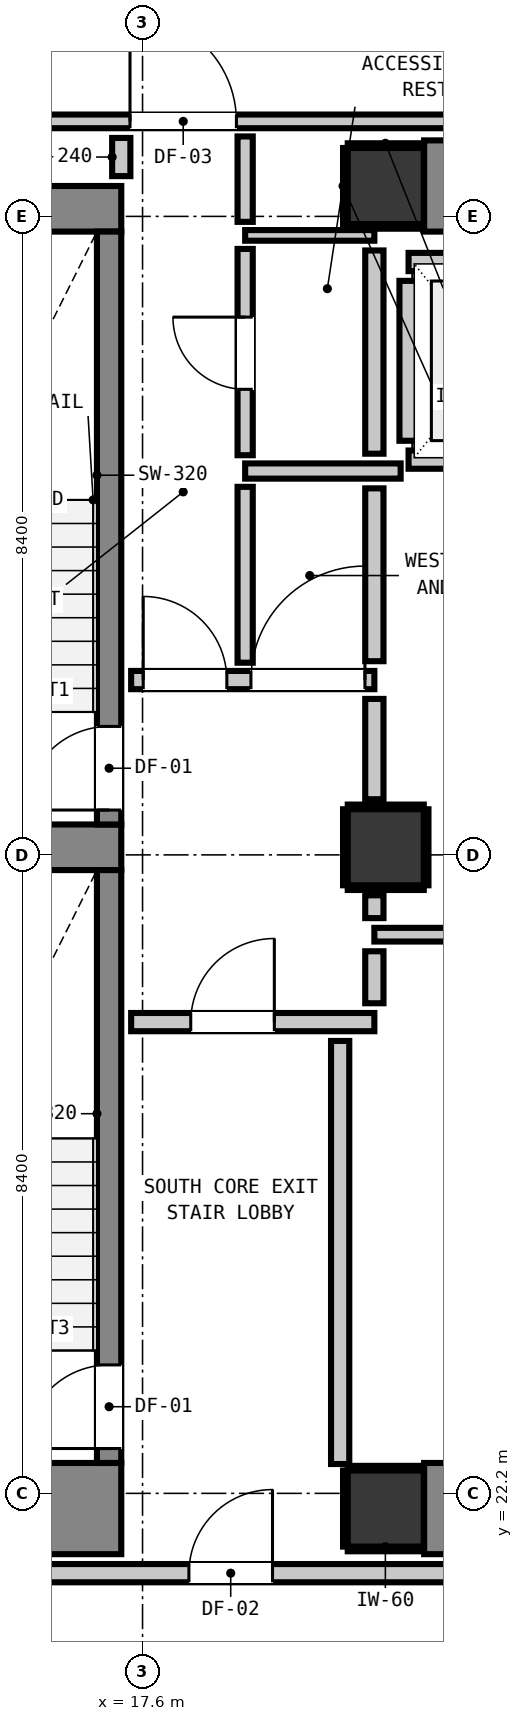
"""IFC4 building model, lengths in metres.
Left out: names, types, materials, properties, quantities, classifications, styles, units other than length and angle.
Written with IfcOpenShell. Run it as: python <this file> out.ifc"""

import sys

from ifc_helpers import new_model, si_unit, direction, frame, frame_2d, origin, origin_2d, place, context, subcontext, project, spatial, rectangle, extrude, element, fill, save


model = new_model("IFC4")
c1 = context("Model", 3, precision=1e-05, world=origin(), true_north=direction((0.0, 1.0)))
c2 = subcontext(c1, "Body", "Model", "MODEL_VIEW")
j1 = project(units=[si_unit("LENGTHUNIT", "METRE"), si_unit("PLANEANGLEUNIT", "RADIAN")], contexts=[c1])
p1 = place(None, origin())
s1 = spatial("IfcSite", under=j1, at=p1, CompositionType="ELEMENT")
p2 = place(p1, origin())
s2 = spatial("IfcBuilding", under=s1, at=p2, CompositionType="ELEMENT")
p3 = place(p2, frame((0.0, 0.0, 61.84)))
s3 = spatial("IfcBuildingStorey", under=s2, at=p3, CompositionType="ELEMENT", Elevation=61.84)
for number, where, z_axis, x_axis in (
    (1, (20.8, 22.0, 0.0), (0.0, 0.0, 1.0), (1.0, 0.0, 0.0)),
    (2, (20.8, 39.4, 0.0), (0.0, 0.0, 1.0), (1.0, 0.0, 0.0)),
):
    element("IfcColumn", number, at=place(p3, frame(where, z_axis=z_axis, x_axis=x_axis)), inside=s3, PredefinedType="COLUMN", context=c2, shape_type="SweptSolid", body=[
        extrude(rectangle(XDim=1.0, YDim=1.0, at=origin_2d()), origin(), (0.0, 0.0, 1.0), 3.32),
    ])
p4 = place(p3, frame((13.24, 22.0, 0.0), z_axis=(0.0, 0.0, 1.0), x_axis=(1.0, 0.0, 0.0)))
e3 = element("IfcWall", 3, at=p4, inside=s3, PredefinedType="SHEAR", context=c2, shape_type="SweptSolid", body=[
    extrude(rectangle(XDim=4.08, YDim=1.2, at=frame_2d((2.04, 0.0))), origin(), (0.0, 0.0, 1.0), 3.32),
])
p5 = place(p3, frame((13.24, 39.1, 0.0), z_axis=(0.0, 0.0, 1.0), x_axis=(1.0, 0.0, 0.0)))
e4 = element("IfcWall", 4, at=p5, inside=s3, PredefinedType="SHEAR", context=c2, shape_type="SweptSolid", body=[
    extrude(rectangle(XDim=4.08, YDim=0.6, at=frame_2d((2.04, 0.0))), origin(), (0.0, 0.0, 1.0), 3.32),
])
p6 = place(p3, frame((13.905, 30.7, 0.0), z_axis=(0.0, 0.0, 1.0), x_axis=(1.0, 0.0, 0.0)))
e5 = element("IfcWall", 5, at=p6, inside=s3, PredefinedType="SHEAR", context=c2, shape_type="SweptSolid", body=[
    extrude(rectangle(XDim=3.415, YDim=0.6, at=frame_2d((1.708, 0.0))), origin(), (0.0, 0.0, 1.0), 3.32),
])
for number, where, z_axis, x_axis in (
    (6, (21.305, 22.0, 0.0), (0.0, 0.0, 1.0), (1.0, 0.0, 0.0)),
    (7, (21.305, 39.4, 0.0), (0.0, 0.0, 1.0), (1.0, 0.0, 0.0)),
):
    element("IfcWall", number, at=place(p3, frame(where, z_axis=z_axis, x_axis=x_axis)), inside=s3, PredefinedType="SHEAR", context=c2, shape_type="SweptSolid", body=[
        extrude(rectangle(XDim=7.39, YDim=1.2, at=frame_2d((3.695, 0.0))), origin(), (0.0, 0.0, 1.0), 3.32),
    ])
p7 = place(p3, frame((17.16, 31.0, 0.0), z_axis=(0.0, 0.0, 1.0), x_axis=(0.0, 1.0, 0.0)))
e8 = element("IfcWall", 8, at=p7, inside=s3, PredefinedType="SHEAR", context=c2, shape_type="SweptSolid", body=[
    extrude(rectangle(XDim=7.8, YDim=0.32, at=frame_2d((3.9, 0.0))), origin(), (0.0, 0.0, 1.0), 3.32),
])
p8 = place(p7, frame((0.19, 0.0, 0.0)))
e9 = element("IfcOpeningElement", 9, at=p8, cuts=e8, PredefinedType="OPENING", context=c2, shape_type="SweptSolid", body=[
    extrude(rectangle(XDim=1.1, YDim=2.15, at=frame_2d((0.55, 1.075))), frame((0.0, 0.17, 0.0), z_axis=(0.0, -1.0, 0.0), x_axis=(1.0, 0.0, 0.0)), (0.0, 0.0, 1.0), 0.34),
])
p9 = place(p3, frame((17.16, 22.6, 0.0), z_axis=(0.0, 0.0, 1.0), x_axis=(0.0, 1.0, 0.0)))
e10 = element("IfcWall", 10, at=p9, inside=s3, PredefinedType="SHEAR", context=c2, shape_type="SweptSolid", body=[
    extrude(rectangle(XDim=7.8, YDim=0.32, at=frame_2d((3.9, 0.0))), origin(), (0.0, 0.0, 1.0), 3.32),
])
p10 = place(p9, frame((0.19, 0.0, 0.0)))
e11 = element("IfcOpeningElement", 11, at=p10, cuts=e10, PredefinedType="OPENING", context=c2, shape_type="SweptSolid", body=[
    extrude(rectangle(XDim=1.1, YDim=2.15, at=frame_2d((0.55, 1.075))), frame((0.0, 0.17, 0.0), z_axis=(0.0, -1.0, 0.0), x_axis=(1.0, 0.0, 0.0)), (0.0, 0.0, 1.0), 0.34),
])
p11 = place(p3, frame((20.8, 30.7, 0.0), z_axis=(0.0, 0.0, 1.0), x_axis=(1.0, 0.0, 0.0)))
e12 = element("IfcColumn", 12, at=p11, inside=s3, PredefinedType="COLUMN", context=c2, shape_type="SweptSolid", body=[
    extrude(rectangle(XDim=1.0, YDim=1.0, at=origin_2d()), origin(), (0.0, 0.0, 1.0), 3.32),
])
for number, where, z_axis, x_axis in (
    (13, (21.1, 35.8, 0.0), (0.0, 0.0, 1.0), (1.0, 0.0, 0.0)),
    (14, (21.1, 38.4, 0.0), (0.0, 0.0, 1.0), (1.0, 0.0, 0.0)),
):
    element("IfcWall", number, at=place(p3, frame(where, z_axis=z_axis, x_axis=x_axis)), inside=s3, PredefinedType="PARTITIONING", context=c2, shape_type="SweptSolid", body=[
        extrude(rectangle(XDim=2.2, YDim=0.24, at=frame_2d((1.1, 0.0))), origin(), (0.0, 0.0, 1.0), 3.06),
    ])
p12 = place(p3, frame((21.1, 36.048, 0.0), z_axis=(0.0, 0.0, 1.0), x_axis=(0.0, 1.0, 0.0)))
e15 = element("IfcWall", 15, at=p12, inside=s3, PredefinedType="PARTITIONING", context=c2, shape_type="SweptSolid", body=[
    extrude(rectangle(XDim=2.104, YDim=0.24, at=frame_2d((1.052, 0.0))), origin(), (0.0, 0.0, 1.0), 2.295),
])
p13 = place(p3, frame((10.15, 21.15, 0.0), z_axis=(0.0, 0.0, 1.0), x_axis=(1.0, 0.0, 0.0)))
e16 = element("IfcWall", 16, at=p13, inside=s3, PredefinedType="PARTITIONING", context=c2, shape_type="SweptSolid", body=[
    extrude(rectangle(XDim=26.779, YDim=0.24, at=frame_2d((13.39, 0.0))), origin(), (0.0, 0.0, 1.0), 3.06),
])
p14 = place(p13, frame((8.06, 0.0, 0.0)))
e17 = element("IfcOpeningElement", 17, at=p14, cuts=e16, PredefinedType="OPENING", context=c2, shape_type="SweptSolid", body=[
    extrude(rectangle(XDim=1.1, YDim=2.15, at=frame_2d((0.55, 1.075))), frame((0.0, 0.13, 0.0), z_axis=(0.0, -1.0, 0.0), x_axis=(1.0, 0.0, 0.0)), (0.0, 0.0, 1.0), 0.26),
])
p15 = place(p13, frame((0.324, 0.0, 0.0)))
e18 = element("IfcOpeningElement", 18, at=p15, cuts=e16, PredefinedType="OPENING", context=c2, shape_type="SweptSolid", body=[
    extrude(rectangle(XDim=1.4, YDim=2.15, at=frame_2d((0.7, 1.075))), frame((0.0, 0.13, 0.0), z_axis=(0.0, -1.0, 0.0), x_axis=(1.0, 0.0, 0.0)), (0.0, 0.0, 1.0), 0.26),
])
p16 = place(p3, frame((17.45, 28.4, 0.0), z_axis=(0.0, 0.0, 1.0), x_axis=(1.0, 0.0, 0.0)))
e19 = element("IfcWall", 19, at=p16, inside=s3, PredefinedType="PARTITIONING", context=c2, shape_type="SweptSolid", body=[
    extrude(rectangle(XDim=3.2, YDim=0.24, at=frame_2d((1.6, 0.0))), origin(), (0.0, 0.0, 1.0), 3.06),
])
p17 = place(p16, frame((0.784, 0.0, 0.0)))
e20 = element("IfcOpeningElement", 20, at=p17, cuts=e19, PredefinedType="OPENING", context=c2, shape_type="SweptSolid", body=[
    extrude(rectangle(XDim=1.1, YDim=2.15, at=frame_2d((0.55, 1.075))), frame((0.0, 0.13, 0.0), z_axis=(0.0, -1.0, 0.0), x_axis=(1.0, 0.0, 0.0)), (0.0, 0.0, 1.0), 0.26),
])
p18 = place(p3, frame((17.45, 32.9, 0.0), z_axis=(0.0, 0.0, 1.0), x_axis=(1.0, 0.0, 0.0)))
e21 = element("IfcWall", 21, at=p18, inside=s3, PredefinedType="PARTITIONING", context=c2, shape_type="SweptSolid", body=[
    extrude(rectangle(XDim=3.2, YDim=0.24, at=frame_2d((1.6, 0.0))), origin(), (0.0, 0.0, 1.0), 3.06),
])
p19 = place(p18, frame((0.159, 0.0, 0.0)))
e22 = element("IfcOpeningElement", 22, at=p19, cuts=e21, PredefinedType="OPENING", context=c2, shape_type="SweptSolid", body=[
    extrude(rectangle(XDim=1.1, YDim=2.15, at=frame_2d((0.55, 1.075))), frame((0.0, 0.13, 0.0), z_axis=(0.0, -1.0, 0.0), x_axis=(1.0, 0.0, 0.0)), (0.0, 0.0, 1.0), 0.26),
])
p20 = place(p18, frame((1.576, 0.0, 0.0)))
e23 = element("IfcOpeningElement", 23, at=p20, cuts=e21, PredefinedType="OPENING", context=c2, shape_type="SweptSolid", body=[
    extrude(rectangle(XDim=1.5, YDim=2.15, at=frame_2d((0.75, 1.075))), frame((0.0, 0.13, 0.0), z_axis=(0.0, -1.0, 0.0), x_axis=(1.0, 0.0, 0.0)), (0.0, 0.0, 1.0), 0.26),
])
p21 = place(p3, frame((18.95, 35.65, 0.0), z_axis=(0.0, 0.0, 1.0), x_axis=(1.0, 0.0, 0.0)))
e24 = element("IfcWall", 24, at=p21, inside=s3, PredefinedType="PARTITIONING", context=c2, shape_type="SweptSolid", body=[
    extrude(rectangle(XDim=2.046, YDim=0.2, at=frame_2d((1.023, 0.0))), origin(), (0.0, 0.0, 1.0), 3.06),
])
p22 = place(p3, frame((20.65, 29.55, 0.0), z_axis=(0.0, 0.0, 1.0), x_axis=(1.0, 0.0, 0.0)))
e25 = element("IfcWall", 25, at=p22, inside=s3, PredefinedType="PARTITIONING", context=c2, shape_type="SweptSolid", body=[
    extrude(rectangle(XDim=9.325, YDim=0.18, at=frame_2d((4.663, 0.0))), origin(), (0.0, 0.0, 1.0), 3.06),
])
p23 = place(p3, frame((10.15, 40.25, 0.0), z_axis=(0.0, 0.0, 1.0), x_axis=(1.0, 0.0, 0.0)))
e26 = element("IfcWall", 26, at=p23, inside=s3, PredefinedType="PARTITIONING", context=c2, shape_type="SweptSolid", body=[
    extrude(rectangle(XDim=40.023, YDim=0.18, at=frame_2d((20.012, 0.0))), origin(), (0.0, 0.0, 1.0), 3.06),
])
p24 = place(p23, frame((7.285, 0.0, 0.0)))
e27 = element("IfcOpeningElement", 27, at=p24, cuts=e26, PredefinedType="OPENING", context=c2, shape_type="SweptSolid", body=[
    extrude(rectangle(XDim=1.4, YDim=2.15, at=frame_2d((0.7, 1.075))), frame((0.0, 0.1, 0.0), z_axis=(0.0, -1.0, 0.0), x_axis=(1.0, 0.0, 0.0)), (0.0, 0.0, 1.0), 0.2),
])
p25 = place(p23, frame((0.324, 0.0, 0.0)))
e28 = element("IfcOpeningElement", 28, at=p25, cuts=e26, PredefinedType="OPENING", context=c2, shape_type="SweptSolid", body=[
    extrude(rectangle(XDim=1.4, YDim=2.15, at=frame_2d((0.7, 1.075))), frame((0.0, 0.1, 0.0), z_axis=(0.0, -1.0, 0.0), x_axis=(1.0, 0.0, 0.0)), (0.0, 0.0, 1.0), 0.2),
])
p26 = place(p23, frame((31.825, 0.0, 0.0)))
e29 = element("IfcOpeningElement", 29, at=p26, cuts=e26, PredefinedType="OPENING", context=c2, shape_type="SweptSolid", body=[
    extrude(rectangle(XDim=1.0, YDim=2.15, at=frame_2d((0.5, 1.075))), frame((0.0, 0.1, 0.0), z_axis=(0.0, -1.0, 0.0), x_axis=(1.0, 0.0, 0.0)), (0.0, 0.0, 1.0), 0.2),
])
p27 = place(p3, frame((18.95, 38.75, 0.0), z_axis=(0.0, 0.0, 1.0), x_axis=(1.0, 0.0, 0.0)))
e30 = element("IfcWall", 30, at=p27, inside=s3, PredefinedType="PARTITIONING", context=c2, shape_type="SweptSolid", body=[
    extrude(rectangle(XDim=1.7, YDim=0.14, at=frame_2d((0.85, 0.0))), origin(), (0.0, 0.0, 1.0), 3.06),
])
p28 = place(p3, frame((17.32, 39.53, 0.0), z_axis=(0.0, 0.0, 1.0), x_axis=(0.0, 1.0, 0.0)))
e31 = element("IfcWall", 31, at=p28, inside=s3, PredefinedType="PARTITIONING", context=c2, shape_type="SweptSolid", body=[
    extrude(rectangle(XDim=0.502, YDim=0.24, at=frame_2d((0.251, 0.0))), origin(), (0.0, 0.0, 1.0), 3.06),
])
p29 = place(p3, frame((20.2, 22.586, 0.0), z_axis=(0.0, 0.0, 1.0), x_axis=(0.0, 1.0, 0.0)))
e32 = element("IfcWall", 32, at=p29, inside=s3, PredefinedType="PARTITIONING", context=c2, shape_type="SweptSolid", body=[
    extrude(rectangle(XDim=5.566, YDim=0.24, at=frame_2d((2.783, 0.0))), origin(), (0.0, 0.0, 1.0), 3.06),
])
p30 = place(p3, frame((20.65, 28.648, 0.0), z_axis=(0.0, 0.0, 1.0), x_axis=(0.0, 1.0, 0.0)))
e33 = element("IfcWall", 33, at=p30, inside=s3, PredefinedType="PARTITIONING", context=c2, shape_type="SweptSolid", body=[
    extrude(rectangle(XDim=0.684, YDim=0.24, at=frame_2d((0.342, 0.0))), origin(), (0.0, 0.0, 1.0), 2.295),
])
p31 = place(p3, frame((20.65, 29.768, 0.0), z_axis=(0.0, 0.0, 1.0), x_axis=(0.0, 1.0, 0.0)))
e34 = element("IfcWall", 34, at=p31, inside=s3, PredefinedType="PARTITIONING", context=c2, shape_type="SweptSolid", body=[
    extrude(rectangle(XDim=0.3, YDim=0.24, at=frame_2d((0.15, 0.0))), origin(), (0.0, 0.0, 1.0), 2.295),
])
p32 = place(p3, frame((20.65, 31.332, 0.0), z_axis=(0.0, 0.0, 1.0), x_axis=(0.0, 1.0, 0.0)))
e35 = element("IfcWall", 35, at=p32, inside=s3, PredefinedType="PARTITIONING", context=c2, shape_type="SweptSolid", body=[
    extrude(rectangle(XDim=1.32, YDim=0.24, at=frame_2d((0.66, 0.0))), origin(), (0.0, 0.0, 1.0), 2.295),
])
p33 = place(p3, frame((20.65, 33.148, 0.0), z_axis=(0.0, 0.0, 1.0), x_axis=(0.0, 1.0, 0.0)))
e36 = element("IfcWall", 36, at=p33, inside=s3, PredefinedType="PARTITIONING", context=c2, shape_type="SweptSolid", body=[
    extrude(rectangle(XDim=2.274, YDim=0.24, at=frame_2d((1.137, 0.0))), origin(), (0.0, 0.0, 1.0), 2.295),
])
p34 = place(p3, frame((20.65, 35.878, 0.0), z_axis=(0.0, 0.0, 1.0), x_axis=(0.0, 1.0, 0.0)))
e37 = element("IfcWall", 37, at=p34, inside=s3, PredefinedType="PARTITIONING", context=c2, shape_type="SweptSolid", body=[
    extrude(rectangle(XDim=2.674, YDim=0.24, at=frame_2d((1.337, 0.0))), origin(), (0.0, 0.0, 1.0), 2.295),
])
p35 = place(p3, frame((18.95, 33.128, 0.0), z_axis=(0.0, 0.0, 1.0), x_axis=(0.0, 1.0, 0.0)))
e38 = element("IfcWall", 38, at=p35, inside=s3, PredefinedType="PARTITIONING", context=c2, shape_type="SweptSolid", body=[
    extrude(rectangle(XDim=2.314, YDim=0.2, at=frame_2d((1.157, 0.0))), origin(), (0.0, 0.0, 1.0), 3.06),
])
p36 = place(p3, frame((18.95, 35.858, 0.0), z_axis=(0.0, 0.0, 1.0), x_axis=(0.0, 1.0, 0.0)))
e39 = element("IfcWall", 39, at=p36, inside=s3, PredefinedType="PARTITIONING", context=c2, shape_type="SweptSolid", body=[
    extrude(rectangle(XDim=2.714, YDim=0.2, at=frame_2d((1.357, 0.0))), origin(), (0.0, 0.0, 1.0), 3.06),
])
p37 = place(p36, frame((0.867, 0.0, 0.0)))
e40 = element("IfcOpeningElement", 40, at=p37, cuts=e39, PredefinedType="OPENING", context=c2, shape_type="SweptSolid", body=[
    extrude(rectangle(XDim=0.95, YDim=2.1, at=frame_2d((0.475, 1.05))), frame((0.0, 0.11, 0.0), z_axis=(0.0, -1.0, 0.0), x_axis=(1.0, 0.0, 0.0)), (0.0, 0.0, 1.0), 0.22),
])
p38 = place(p3, frame((18.95, 38.928, 0.0), z_axis=(0.0, 0.0, 1.0), x_axis=(0.0, 1.0, 0.0)))
e41 = element("IfcWall", 41, at=p38, inside=s3, PredefinedType="PARTITIONING", context=c2, shape_type="SweptSolid", body=[
    extrude(rectangle(XDim=1.124, YDim=0.2, at=frame_2d((0.562, 0.0))), origin(), (0.0, 0.0, 1.0), 3.06),
])
for number, where, z_axis, x_axis in (
    (42, (20.3, 21.468, 0.0), (0.0, 0.0, 1.0), (1.0, 0.0, 0.0)),
    (43, (20.3, 22.532, 0.0), (0.0, 0.0, 1.0), (1.0, 0.0, 0.0)),
):
    element("IfcWall", number, at=place(p3, frame(where, z_axis=z_axis, x_axis=x_axis)), inside=s3, PredefinedType="PARTITIONING", context=c2, shape_type="SweptSolid", body=[
        extrude(rectangle(XDim=0.99, YDim=0.06, at=frame_2d((0.495, 0.0))), origin(), (0.0, 0.0, 1.0), 1.45),
    ])
p39 = place(p3, frame((20.268, 21.5, 0.0), z_axis=(0.0, 0.0, 1.0), x_axis=(0.0, 1.0, 0.0)))
e44 = element("IfcWall", 44, at=p39, inside=s3, PredefinedType="PARTITIONING", context=c2, shape_type="SweptSolid", body=[
    extrude(rectangle(XDim=1.0, YDim=0.06, at=frame_2d((0.5, 0.0))), origin(), (0.0, 0.0, 1.0), 1.45),
])
for number, where, z_axis, x_axis in (
    (45, (20.3, 38.868, 0.0), (0.0, 0.0, 1.0), (1.0, 0.0, 0.0)),
    (46, (20.3, 39.932, 0.0), (0.0, 0.0, 1.0), (1.0, 0.0, 0.0)),
):
    element("IfcWall", number, at=place(p3, frame(where, z_axis=z_axis, x_axis=x_axis)), inside=s3, PredefinedType="PARTITIONING", context=c2, shape_type="SweptSolid", body=[
        extrude(rectangle(XDim=0.99, YDim=0.06, at=frame_2d((0.495, 0.0))), origin(), (0.0, 0.0, 1.0), 1.45),
    ])
for number, where, z_axis, x_axis in (
    (47, (20.268, 38.9, 0.0), (0.0, 0.0, 1.0), (0.0, 1.0, 0.0)),
    (48, (20.3, 30.168, 0.0), (0.0, 0.0, 1.0), (1.0, 0.0, 0.0)),
    (49, (20.3, 31.232, 0.0), (0.0, 0.0, 1.0), (1.0, 0.0, 0.0)),
    (50, (20.268, 30.2, 0.0), (0.0, 0.0, 1.0), (0.0, 1.0, 0.0)),
    (51, (21.332, 30.2, 0.0), (0.0, 0.0, 1.0), (0.0, 1.0, 0.0)),
):
    element("IfcWall", number, at=place(p3, frame(where, z_axis=z_axis, x_axis=x_axis)), inside=s3, PredefinedType="PARTITIONING", context=c2, shape_type="SweptSolid", body=[
        extrude(rectangle(XDim=1.0, YDim=0.06, at=frame_2d((0.5, 0.0))), origin(), (0.0, 0.0, 1.0), 1.45),
    ])
p40 = place(p8, origin())
e52 = element("IfcDoor", 52, at=p40, inside=s3, OperationType="SINGLE_SWING_LEFT", PredefinedType="DOOR", context=c2, shape_type="SweptSolid", body=[
    extrude(rectangle(XDim=1.1, YDim=2.15, at=frame_2d((0.55, 1.075))), frame((0.0, 0.025, 0.0), z_axis=(0.0, -1.0, 0.0), x_axis=(1.0, 0.0, 0.0)), (0.0, 0.0, 1.0), 0.05),
])
fill(e9, e52)
p41 = place(p10, origin())
e53 = element("IfcDoor", 53, at=p41, inside=s3, OperationType="SINGLE_SWING_LEFT", PredefinedType="DOOR", context=c2, shape_type="SweptSolid", body=[
    extrude(rectangle(XDim=1.1, YDim=2.15, at=frame_2d((0.55, 1.075))), frame((0.0, 0.025, 0.0), z_axis=(0.0, -1.0, 0.0), x_axis=(1.0, 0.0, 0.0)), (0.0, 0.0, 1.0), 0.05),
])
fill(e11, e53)
p42 = place(p17, origin())
e54 = element("IfcDoor", 54, at=p42, inside=s3, OperationType="SINGLE_SWING_RIGHT", PredefinedType="DOOR", context=c2, shape_type="SweptSolid", body=[
    extrude(rectangle(XDim=1.1, YDim=2.15, at=frame_2d((0.55, 1.075))), frame((0.0, 0.025, 0.0), z_axis=(0.0, -1.0, 0.0), x_axis=(1.0, 0.0, 0.0)), (0.0, 0.0, 1.0), 0.05),
])
fill(e20, e54)
p43 = place(p19, origin())
e55 = element("IfcDoor", 55, at=p43, inside=s3, OperationType="SINGLE_SWING_LEFT", PredefinedType="DOOR", context=c2, shape_type="SweptSolid", body=[
    extrude(rectangle(XDim=1.1, YDim=2.15, at=frame_2d((0.55, 1.075))), frame((0.0, 0.025, 0.0), z_axis=(0.0, -1.0, 0.0), x_axis=(1.0, 0.0, 0.0)), (0.0, 0.0, 1.0), 0.05),
])
fill(e22, e55)
p44 = place(p14, origin())
e56 = element("IfcDoor", 56, at=p44, inside=s3, OperationType="SINGLE_SWING_RIGHT", PredefinedType="DOOR", context=c2, shape_type="SweptSolid", body=[
    extrude(rectangle(XDim=1.1, YDim=2.15, at=frame_2d((0.55, 1.075))), frame((0.0, 0.025, 0.0), z_axis=(0.0, -1.0, 0.0), x_axis=(1.0, 0.0, 0.0)), (0.0, 0.0, 1.0), 0.05),
])
fill(e17, e56)
p45 = place(p24, origin())
e57 = element("IfcDoor", 57, at=p45, inside=s3, OperationType="SINGLE_SWING_LEFT", PredefinedType="DOOR", context=c2, shape_type="SweptSolid", body=[
    extrude(rectangle(XDim=1.4, YDim=2.15, at=frame_2d((0.7, 1.075))), frame((0.0, 0.025, 0.0), z_axis=(0.0, -1.0, 0.0), x_axis=(1.0, 0.0, 0.0)), (0.0, 0.0, 1.0), 0.05),
])
fill(e27, e57)
p46 = place(p20, origin())
e58 = element("IfcDoor", 58, at=p46, inside=s3, OperationType="SINGLE_SWING_RIGHT", PredefinedType="DOOR", context=c2, shape_type="SweptSolid", body=[
    extrude(rectangle(XDim=1.5, YDim=2.15, at=frame_2d((0.75, 1.075))), frame((0.0, 0.025, 0.0), z_axis=(0.0, -1.0, 0.0), x_axis=(1.0, 0.0, 0.0)), (0.0, 0.0, 1.0), 0.05),
])
fill(e23, e58)
p47 = place(p37, origin())
e59 = element("IfcDoor", 59, at=p47, inside=s3, OperationType="SINGLE_SWING_RIGHT", PredefinedType="DOOR", context=c2, shape_type="SweptSolid", body=[
    extrude(rectangle(XDim=0.95, YDim=2.1, at=frame_2d((0.475, 1.05))), frame((0.0, 0.025, 0.0), z_axis=(0.0, -1.0, 0.0), x_axis=(1.0, 0.0, 0.0)), (0.0, 0.0, 1.0), 0.05),
])
fill(e40, e59)
save(model, sys.argv[1])
